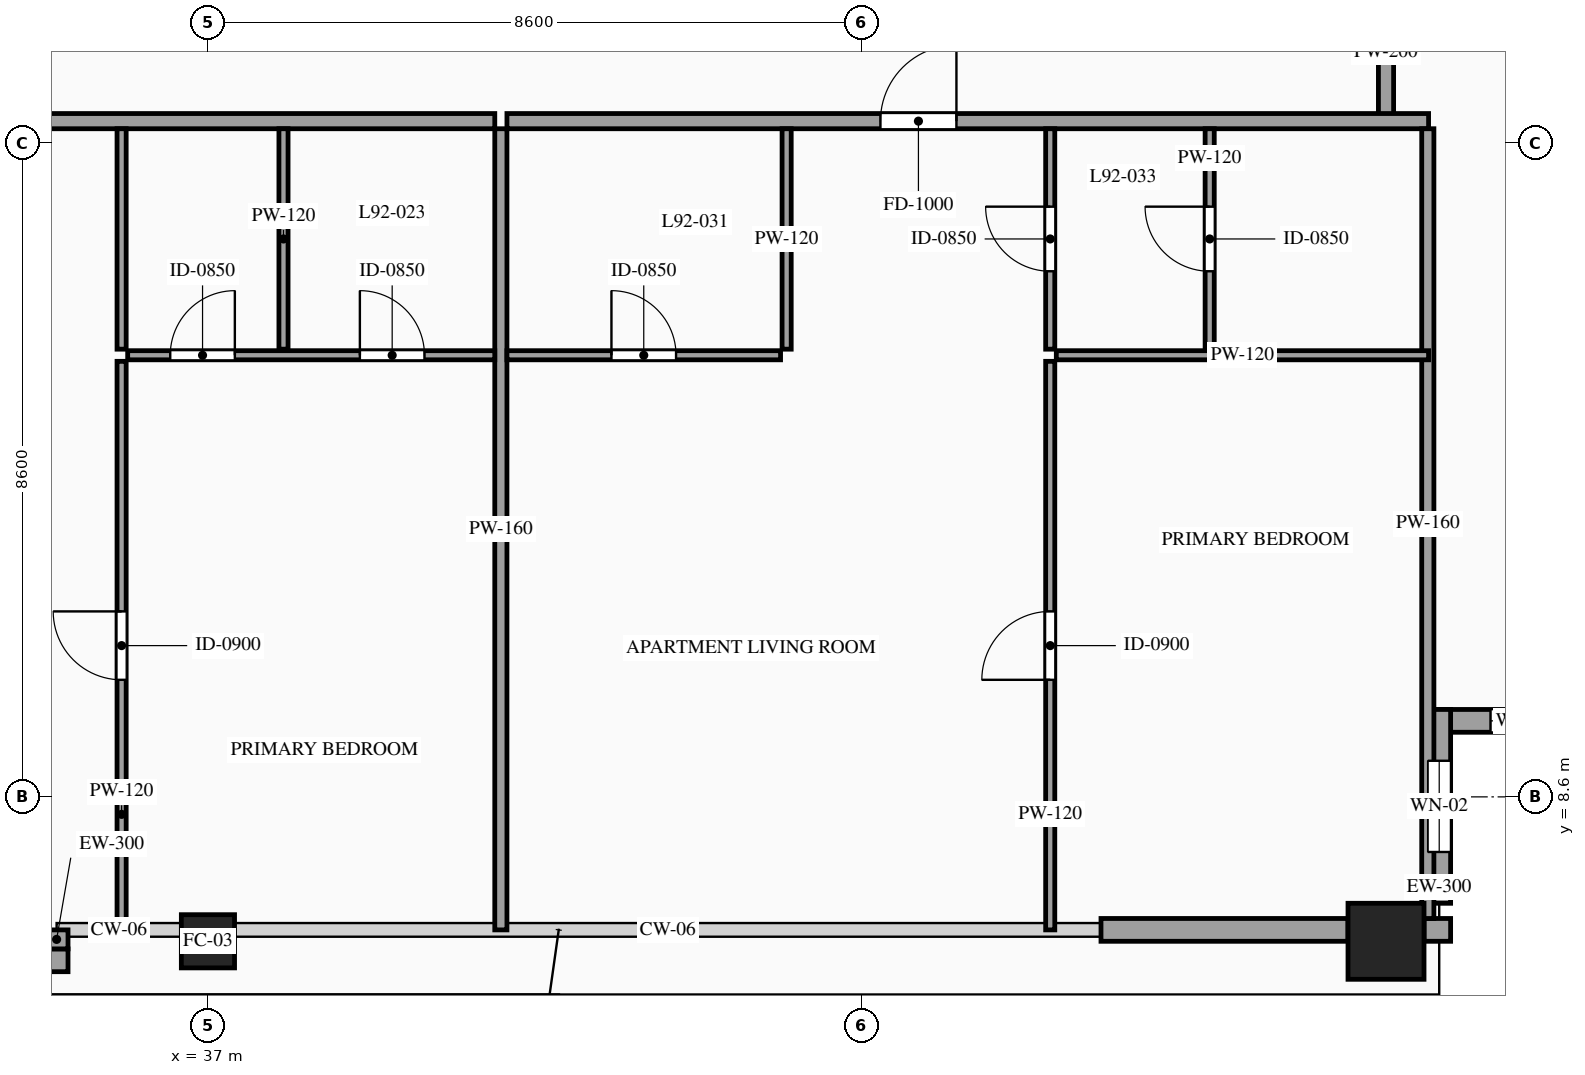
"""IFC4 building model, lengths in metres.
Left out: names, types, materials, properties, quantities, classifications, styles, units other than length and angle.
Written with IfcOpenShell. Run it as: python <this file> out.ifc"""

import sys

from ifc_helpers import new_model, si_unit, direction, frame, frame_2d, origin, origin_2d, place, context, subcontext, project, spatial, rectangle, hollow_rectangle, extrude, source, transform, mapped, element, fill, save


model = new_model("IFC4")
c1 = context("Model", 3, precision=1e-05, world=origin(), true_north=direction((0.0, 1.0)))
c2 = subcontext(c1, "Body", "Model", "MODEL_VIEW")
j1 = project(units=[si_unit("LENGTHUNIT", "METRE"), si_unit("PLANEANGLEUNIT", "RADIAN")], contexts=[c1])
p1 = place(None, origin())
s1 = spatial("IfcSite", under=j1, at=p1, CompositionType="ELEMENT")
p2 = place(p1, origin())
s2 = spatial("IfcBuilding", under=s1, at=p2, CompositionType="ELEMENT")
p3 = place(p2, frame((0.0, 0.0, 343.2)))
s3 = spatial("IfcBuildingStorey", under=s2, at=p3, CompositionType="ELEMENT", Elevation=343.2)
m1 = source(origin(), c2, "Body", "SweptSolid", [
    extrude(hollow_rectangle(XDim=0.7, YDim=0.7, WallThickness=0.032, at=origin_2d()), origin(), (0.0, 0.0, 1.0), 4.0),
])
p4 = place(p3, frame((37.0, 6.7, 0.0), z_axis=(0.0, 0.0, 1.0), x_axis=(1.0, 0.0, 0.0)))
e1 = element("IfcColumn", 1, at=p4, inside=s3, PredefinedType="COLUMN", context=c2, shape_type="MappedRepresentation", body=[
    mapped(m1, transform((0.0, 0.0, 0.0), scale=1.0)),
])
m2 = source(origin(), c2, "Body", "SweptSolid", [
    extrude(hollow_rectangle(XDim=1.0, YDim=1.0, WallThickness=0.048, at=origin_2d()), origin(), (0.0, 0.0, 1.0), 4.0),
])
p5 = place(p3, frame((52.5, 6.7, 0.0), z_axis=(0.0, 0.0, 1.0), x_axis=(1.0, 0.0, 0.0)))
e2 = element("IfcColumn", 2, at=p5, inside=s3, PredefinedType="COLUMN", context=c2, shape_type="MappedRepresentation", body=[
    mapped(m2, transform((0.0, 0.0, 0.0), scale=1.0)),
])
p6 = place(p3, frame((53.05, 9.6, 0.0), z_axis=(0.0, 0.0, 1.0), x_axis=(1.0, 0.0, 0.0)))
e3 = element("IfcWall", 3, at=p6, inside=s3, PredefinedType="SOLIDWALL", context=c2, shape_type="SweptSolid", body=[
    extrude(rectangle(XDim=2.55, YDim=0.3, at=frame_2d((1.275, 0.0))), origin(), (0.0, 0.0, 1.0), 3.76),
])
p7 = place(p6, frame((0.825, 0.0, 0.85)))
e4 = element("IfcOpeningElement", 4, at=p7, cuts=e3, PredefinedType="OPENING", context=c2, shape_type="SweptSolid", body=[
    extrude(rectangle(XDim=0.9, YDim=1.5, at=frame_2d((0.45, 0.75))), frame((0.0, 0.165, 0.0), z_axis=(0.0, -1.0, 0.0), x_axis=(1.0, 0.0, 0.0)), (0.0, 0.0, 1.0), 0.33),
])
p8 = place(p3, frame((53.2, 7.2, 0.0), z_axis=(0.0, 0.0, 1.0), x_axis=(0.0, 1.0, 0.0)))
e5 = element("IfcWall", 5, at=p8, inside=s3, PredefinedType="SOLIDWALL", context=c2, shape_type="SweptSolid", body=[
    extrude(rectangle(XDim=2.55, YDim=0.3, at=frame_2d((1.275, 0.0))), origin(), (0.0, 0.0, 1.0), 3.76),
])
p9 = place(p8, frame((0.675, 0.0, 0.85)))
e6 = element("IfcOpeningElement", 6, at=p9, cuts=e5, PredefinedType="OPENING", context=c2, shape_type="SweptSolid", body=[
    extrude(rectangle(XDim=1.2, YDim=2.1, at=frame_2d((0.6, 1.05))), frame((0.0, 0.165, 0.0), z_axis=(0.0, -1.0, 0.0), x_axis=(1.0, 0.0, 0.0)), (0.0, 0.0, 1.0), 0.33),
])
m3 = source(origin(), c2, "Body", "SweptSolid", [
    extrude(rectangle(XDim=0.35, YDim=0.3, at=frame_2d((0.175, 0.0))), origin(), (0.0, 0.0, 1.0), 3.76),
])
p10 = place(p3, frame((53.0, 6.85, 0.0), z_axis=(0.0, 0.0, 1.0), x_axis=(1.0, 0.0, 0.0)))
e7 = element("IfcWall", 7, at=p10, inside=s3, PredefinedType="SOLIDWALL", context=c2, shape_type="MappedRepresentation", body=[
    mapped(m3, transform((0.0, 0.0, 0.0), scale=1.0)),
])
m4 = source(origin(), c2, "Body", "SweptSolid", [
    extrude(rectangle(XDim=3.25, YDim=0.3, at=frame_2d((1.625, 0.0))), origin(), (0.0, 0.0, 1.0), 3.365),
])
p11 = place(p3, frame((48.75, 6.85, 0.0), z_axis=(0.0, 0.0, 1.0), x_axis=(1.0, 0.0, 0.0)))
e8 = element("IfcWall", 8, at=p11, inside=s3, PredefinedType="SOLIDWALL", context=c2, shape_type="MappedRepresentation", body=[
    mapped(m4, transform((0.0, 0.0, 0.0), scale=1.0)),
])
p12 = place(p3, frame((33.159, 6.45, 0.0), z_axis=(0.0, 0.0, 1.0), x_axis=(1.0, 0.0, 0.0)))
e9 = element("IfcWall", 9, at=p12, inside=s3, PredefinedType="SOLIDWALL", context=c2, shape_type="SweptSolid", body=[
    extrude(rectangle(XDim=2.0, YDim=0.3, at=frame_2d((1.0, 0.0))), origin(), (0.0, 0.0, 1.0), 3.365),
])
p13 = place(p12, frame((0.3, 0.0, 0.0)))
e10 = element("IfcOpeningElement", 10, at=p13, cuts=e9, PredefinedType="OPENING", context=c2, shape_type="SweptSolid", body=[
    extrude(rectangle(XDim=1.4, YDim=2.3, at=frame_2d((0.7, 1.15))), frame((0.0, 0.165, 0.0), z_axis=(0.0, -1.0, 0.0), x_axis=(1.0, 0.0, 0.0)), (0.0, 0.0, 1.0), 0.33),
])
m5 = source(origin(), c2, "Body", "SweptSolid", [
    extrude(rectangle(XDim=0.25, YDim=0.3, at=frame_2d((0.125, 0.0))), origin(), (0.0, 0.0, 1.0), 3.76),
])
p14 = place(p3, frame((35.009, 6.6, 0.0), z_axis=(0.0, 0.0, 1.0), x_axis=(0.0, 1.0, 0.0)))
e11 = element("IfcWall", 11, at=p14, inside=s3, PredefinedType="SOLIDWALL", context=c2, shape_type="MappedRepresentation", body=[
    mapped(m5, transform((0.0, 0.0, 0.0), scale=1.0)),
])
m6 = source(origin(), c2, "Body", "SweptSolid", [
    extrude(rectangle(XDim=1.7, YDim=0.2, at=frame_2d((0.85, 0.0))), origin(), (0.0, 0.0, 1.0), 3.76),
])
p15 = place(p3, frame((52.5, 17.55, 0.0), z_axis=(0.0, 0.0, 1.0), x_axis=(0.0, 1.0, 0.0)))
e12 = element("IfcWall", 12, at=p15, inside=s3, PredefinedType="PARTITIONING", context=c2, shape_type="MappedRepresentation", body=[
    mapped(m6, transform((0.0, 0.0, 0.0), scale=1.0)),
])
p16 = place(p3, frame((20.94, 17.49, 0.0), z_axis=(0.0, 0.0, 1.0), x_axis=(1.0, 0.0, 0.0)))
e13 = element("IfcWall", 13, at=p16, inside=s3, PredefinedType="PARTITIONING", context=c2, shape_type="SweptSolid", body=[
    extrude(rectangle(XDim=19.834, YDim=0.2, at=frame_2d((9.917, 0.0))), origin(), (0.0, 0.0, 1.0), 3.76),
])
p17 = place(p16, frame((11.824, 0.0, 0.0)))
e14 = element("IfcOpeningElement", 14, at=p17, cuts=e13, PredefinedType="OPENING", context=c2, shape_type="SweptSolid", body=[
    extrude(rectangle(XDim=1.0, YDim=2.2, at=frame_2d((0.5, 1.1))), frame((0.0, 0.115, 0.0), z_axis=(0.0, -1.0, 0.0), x_axis=(1.0, 0.0, 0.0)), (0.0, 0.0, 1.0), 0.23),
])
m7 = source(origin(), c2, "Body", "SweptSolid", [
    extrude(rectangle(XDim=10.54, YDim=0.16, at=frame_2d((5.27, 0.0))), origin(), (0.0, 0.0, 1.0), 3.76),
])
p18 = place(p3, frame((40.854, 6.85, 0.0), z_axis=(0.0, 0.0, 1.0), x_axis=(0.0, 1.0, 0.0)))
e15 = element("IfcWall", 15, at=p18, inside=s3, PredefinedType="PARTITIONING", context=c2, shape_type="MappedRepresentation", body=[
    mapped(m7, transform((0.0, 0.0, 0.0), scale=1.0)),
])
m8 = source(origin(), c2, "Body", "SweptSolid", [
    extrude(rectangle(XDim=2.9, YDim=0.12, at=frame_2d((1.45, 0.0))), origin(), (0.0, 0.0, 1.0), 3.76),
])
for number, where, z_axis, x_axis in (
    (16, (37.994, 14.49, 0.0), (0.0, 0.0, 1.0), (0.0, 1.0, 0.0)),
    (17, (35.864, 14.49, 0.0), (0.0, 0.0, 1.0), (0.0, 1.0, 0.0)),
):
    element("IfcWall", number, at=place(p3, frame(where, z_axis=z_axis, x_axis=x_axis)), inside=s3, PredefinedType="PARTITIONING", context=c2, shape_type="MappedRepresentation", body=[
        mapped(m8, transform((0.0, 0.0, 0.0), scale=1.0)),
    ])
p19 = place(p3, frame((35.944, 14.41, 0.0), z_axis=(0.0, 0.0, 1.0), x_axis=(1.0, 0.0, 0.0)))
e18 = element("IfcWall", 18, at=p19, inside=s3, PredefinedType="PARTITIONING", context=c2, shape_type="SweptSolid", body=[
    extrude(rectangle(XDim=4.83, YDim=0.12, at=frame_2d((2.415, 0.0))), origin(), (0.0, 0.0, 1.0), 3.76),
])
p20 = place(p19, frame((3.055, 0.0, 0.0)))
e19 = element("IfcOpeningElement", 19, at=p20, cuts=e18, PredefinedType="OPENING", context=c2, shape_type="SweptSolid", body=[
    extrude(rectangle(XDim=0.85, YDim=2.1, at=frame_2d((0.425, 1.05))), frame((0.0, 0.075, 0.0), z_axis=(0.0, -1.0, 0.0), x_axis=(1.0, 0.0, 0.0)), (0.0, 0.0, 1.0), 0.15),
])
p21 = place(p19, frame((0.56, 0.0, 0.0)))
e20 = element("IfcOpeningElement", 20, at=p21, cuts=e18, PredefinedType="OPENING", context=c2, shape_type="SweptSolid", body=[
    extrude(rectangle(XDim=0.85, YDim=2.1, at=frame_2d((0.425, 1.05))), frame((0.0, 0.075, 0.0), z_axis=(0.0, -1.0, 0.0), x_axis=(1.0, 0.0, 0.0)), (0.0, 0.0, 1.0), 0.15),
])
p22 = place(p3, frame((35.864, 6.85, 0.0), z_axis=(0.0, 0.0, 1.0), x_axis=(0.0, 1.0, 0.0)))
e21 = element("IfcWall", 21, at=p22, inside=s3, PredefinedType="PARTITIONING", context=c2, shape_type="SweptSolid", body=[
    extrude(rectangle(XDim=7.48, YDim=0.12, at=frame_2d((3.74, 0.0))), origin(), (0.0, 0.0, 1.0), 3.76),
])
p23 = place(p22, frame((3.29, 0.0, 0.0)))
e22 = element("IfcOpeningElement", 22, at=p23, cuts=e21, PredefinedType="OPENING", context=c2, shape_type="SweptSolid", body=[
    extrude(rectangle(XDim=0.9, YDim=2.15, at=frame_2d((0.45, 1.075))), frame((0.0, 0.075, 0.0), z_axis=(0.0, -1.0, 0.0), x_axis=(1.0, 0.0, 0.0)), (0.0, 0.0, 1.0), 0.15),
])
p24 = place(p3, frame((40.934, 17.49, 0.0), z_axis=(0.0, 0.0, 1.0), x_axis=(1.0, 0.0, 0.0)))
e23 = element("IfcWall", 23, at=p24, inside=s3, PredefinedType="PARTITIONING", context=c2, shape_type="SweptSolid", body=[
    extrude(rectangle(XDim=12.126, YDim=0.2, at=frame_2d((6.063, 0.0))), origin(), (0.0, 0.0, 1.0), 3.76),
])
p25 = place(p24, frame((4.914, 0.0, 0.0)))
e24 = element("IfcOpeningElement", 24, at=p25, cuts=e23, PredefinedType="OPENING", context=c2, shape_type="SweptSolid", body=[
    extrude(rectangle(XDim=1.0, YDim=2.2, at=frame_2d((0.5, 1.1))), frame((0.0, 0.115, 0.0), z_axis=(0.0, -1.0, 0.0), x_axis=(1.0, 0.0, 0.0)), (0.0, 0.0, 1.0), 0.23),
])
m9 = source(origin(), c2, "Body", "SweptSolid", [
    extrude(rectangle(XDim=10.39, YDim=0.16, at=frame_2d((5.195, 0.0))), origin(), (0.0, 0.0, 1.0), 3.76),
])
p26 = place(p3, frame((53.05, 7.0, 0.0), z_axis=(0.0, 0.0, 1.0), x_axis=(0.0, 1.0, 0.0)))
e25 = element("IfcWall", 25, at=p26, inside=s3, PredefinedType="PARTITIONING", context=c2, shape_type="MappedRepresentation", body=[
    mapped(m9, transform((0.0, 0.0, 0.0), scale=1.0)),
])
p27 = place(p3, frame((40.934, 14.41, 0.0), z_axis=(0.0, 0.0, 1.0), x_axis=(1.0, 0.0, 0.0)))
e26 = element("IfcWall", 26, at=p27, inside=s3, PredefinedType="PARTITIONING", context=c2, shape_type="SweptSolid", body=[
    extrude(rectangle(XDim=3.6, YDim=0.12, at=frame_2d((1.8, 0.0))), origin(), (0.0, 0.0, 1.0), 3.76),
])
p28 = place(p27, frame((1.375, 0.0, 0.0)))
e27 = element("IfcOpeningElement", 27, at=p28, cuts=e26, PredefinedType="OPENING", context=c2, shape_type="SweptSolid", body=[
    extrude(rectangle(XDim=0.85, YDim=2.1, at=frame_2d((0.425, 1.05))), frame((0.0, 0.075, 0.0), z_axis=(0.0, -1.0, 0.0), x_axis=(1.0, 0.0, 0.0)), (0.0, 0.0, 1.0), 0.15),
])
p29 = place(p3, frame((44.614, 14.49, 0.0), z_axis=(0.0, 0.0, 1.0), x_axis=(0.0, 1.0, 0.0)))
e28 = element("IfcWall", 28, at=p29, inside=s3, PredefinedType="PARTITIONING", context=c2, shape_type="MappedRepresentation", body=[
    mapped(m8, transform((0.0, 0.0, 0.0), scale=1.0)),
])
p30 = place(p3, frame((50.18, 14.49, 0.0), z_axis=(0.0, 0.0, 1.0), x_axis=(0.0, 1.0, 0.0)))
e29 = element("IfcWall", 29, at=p30, inside=s3, PredefinedType="PARTITIONING", context=c2, shape_type="SweptSolid", body=[
    extrude(rectangle(XDim=2.9, YDim=0.12, at=frame_2d((1.45, 0.0))), origin(), (0.0, 0.0, 1.0), 3.305),
])
p31 = place(p30, frame((1.025, 0.0, 0.0)))
e30 = element("IfcOpeningElement", 30, at=p31, cuts=e29, PredefinedType="OPENING", context=c2, shape_type="SweptSolid", body=[
    extrude(rectangle(XDim=0.85, YDim=2.1, at=frame_2d((0.425, 1.05))), frame((0.0, 0.075, 0.0), z_axis=(0.0, -1.0, 0.0), x_axis=(1.0, 0.0, 0.0)), (0.0, 0.0, 1.0), 0.15),
])
m10 = source(origin(), c2, "Body", "SweptSolid", [
    extrude(rectangle(XDim=4.898, YDim=0.12, at=frame_2d((2.449, 0.0))), origin(), (0.0, 0.0, 1.0), 3.76),
])
p32 = place(p3, frame((48.162, 14.41, 0.0), z_axis=(0.0, 0.0, 1.0), x_axis=(1.0, 0.0, 0.0)))
e31 = element("IfcWall", 31, at=p32, inside=s3, PredefinedType="PARTITIONING", context=c2, shape_type="MappedRepresentation", body=[
    mapped(m10, transform((0.0, 0.0, 0.0), scale=1.0)),
])
p33 = place(p3, frame((48.082, 6.85, 0.0), z_axis=(0.0, 0.0, 1.0), x_axis=(0.0, 1.0, 0.0)))
e32 = element("IfcWall", 32, at=p33, inside=s3, PredefinedType="PARTITIONING", context=c2, shape_type="SweptSolid", body=[
    extrude(rectangle(XDim=7.48, YDim=0.12, at=frame_2d((3.74, 0.0))), origin(), (0.0, 0.0, 1.0), 3.76),
])
p34 = place(p33, frame((3.29, 0.0, 0.0)))
e33 = element("IfcOpeningElement", 33, at=p34, cuts=e32, PredefinedType="OPENING", context=c2, shape_type="SweptSolid", body=[
    extrude(rectangle(XDim=0.9, YDim=2.15, at=frame_2d((0.45, 1.075))), frame((0.0, 0.075, 0.0), z_axis=(0.0, -1.0, 0.0), x_axis=(1.0, 0.0, 0.0)), (0.0, 0.0, 1.0), 0.15),
])
p35 = place(p3, frame((48.082, 14.49, 0.0), z_axis=(0.0, 0.0, 1.0), x_axis=(0.0, 1.0, 0.0)))
e34 = element("IfcWall", 34, at=p35, inside=s3, PredefinedType="PARTITIONING", context=c2, shape_type="SweptSolid", body=[
    extrude(rectangle(XDim=2.9, YDim=0.12, at=frame_2d((1.45, 0.0))), origin(), (0.0, 0.0, 1.0), 3.76),
])
p36 = place(p35, frame((1.025, 0.0, 0.0)))
e35 = element("IfcOpeningElement", 35, at=p36, cuts=e34, PredefinedType="OPENING", context=c2, shape_type="SweptSolid", body=[
    extrude(rectangle(XDim=0.85, YDim=2.1, at=frame_2d((0.425, 1.05))), frame((0.0, 0.075, 0.0), z_axis=(0.0, -1.0, 0.0), x_axis=(1.0, 0.0, 0.0)), (0.0, 0.0, 1.0), 0.15),
])
m11 = source(origin(), c2, "Body", "SweptSolid", [
    extrude(rectangle(XDim=0.9, YDim=1.5, at=frame_2d((0.45, 0.75))), frame((0.0, 0.03, 0.0), z_axis=(0.0, -1.0, 0.0), x_axis=(1.0, 0.0, 0.0)), (0.0, 0.0, 1.0), 0.06),
])
p37 = place(p7, origin())
e36 = element("IfcWindow", 36, at=p37, inside=s3, PartitioningType="SINGLE_PANEL", PredefinedType="WINDOW", context=c2, shape_type="MappedRepresentation", body=[
    mapped(m11, transform((0.0, 0.0, 0.0), scale=1.0)),
])
fill(e4, e36)
m12 = source(origin(), c2, "Body", "SweptSolid", [
    extrude(rectangle(XDim=1.2, YDim=2.1, at=frame_2d((0.6, 1.05))), frame((0.0, 0.03, 0.0), z_axis=(0.0, -1.0, 0.0), x_axis=(1.0, 0.0, 0.0)), (0.0, 0.0, 1.0), 0.06),
])
p38 = place(p9, origin())
e37 = element("IfcWindow", 37, at=p38, inside=s3, PartitioningType="SINGLE_PANEL", PredefinedType="WINDOW", context=c2, shape_type="MappedRepresentation", body=[
    mapped(m12, transform((0.0, 0.0, 0.0), scale=1.0)),
])
fill(e6, e37)
m13 = source(origin(), c2, "Body", "SweptSolid", [
    extrude(rectangle(XDim=0.85, YDim=2.1, at=frame_2d((0.425, 1.05))), frame((0.0, 0.025, 0.0), z_axis=(0.0, -1.0, 0.0), x_axis=(1.0, 0.0, 0.0)), (0.0, 0.0, 1.0), 0.05),
])
p39 = place(p20, origin())
e38 = element("IfcDoor", 38, at=p39, inside=s3, OperationType="SINGLE_SWING_LEFT", PredefinedType="DOOR", context=c2, shape_type="MappedRepresentation", body=[
    mapped(m13, transform((0.0, 0.0, 0.0), scale=1.0)),
])
fill(e19, e38)
p40 = place(p21, origin())
e39 = element("IfcDoor", 39, at=p40, inside=s3, OperationType="SINGLE_SWING_RIGHT", PredefinedType="DOOR", context=c2, shape_type="MappedRepresentation", body=[
    mapped(m13, transform((0.0, 0.0, 0.0), scale=1.0)),
])
fill(e20, e39)
m14 = source(origin(), c2, "Body", "SweptSolid", [
    extrude(rectangle(XDim=0.9, YDim=2.15, at=frame_2d((0.45, 1.075))), frame((0.0, 0.025, 0.0), z_axis=(0.0, -1.0, 0.0), x_axis=(1.0, 0.0, 0.0)), (0.0, 0.0, 1.0), 0.05),
])
p41 = place(p23, origin())
e40 = element("IfcDoor", 40, at=p41, inside=s3, OperationType="SINGLE_SWING_RIGHT", PredefinedType="DOOR", context=c2, shape_type="MappedRepresentation", body=[
    mapped(m14, transform((0.0, 0.0, 0.0), scale=1.0)),
])
fill(e22, e40)
m15 = source(origin(), c2, "Body", "SweptSolid", [
    extrude(rectangle(XDim=1.0, YDim=2.2, at=frame_2d((0.5, 1.1))), frame((0.0, 0.025, 0.0), z_axis=(0.0, -1.0, 0.0), x_axis=(1.0, 0.0, 0.0)), (0.0, 0.0, 1.0), 0.05),
])
p42 = place(p25, origin())
e41 = element("IfcDoor", 41, at=p42, inside=s3, OperationType="SINGLE_SWING_RIGHT", PredefinedType="DOOR", context=c2, shape_type="MappedRepresentation", body=[
    mapped(m15, transform((0.0, 0.0, 0.0), scale=1.0)),
])
fill(e24, e41)
p43 = place(p28, origin())
e42 = element("IfcDoor", 42, at=p43, inside=s3, OperationType="SINGLE_SWING_LEFT", PredefinedType="DOOR", context=c2, shape_type="MappedRepresentation", body=[
    mapped(m13, transform((0.0, 0.0, 0.0), scale=1.0)),
])
fill(e27, e42)
p44 = place(p31, origin())
e43 = element("IfcDoor", 43, at=p44, inside=s3, OperationType="SINGLE_SWING_RIGHT", PredefinedType="DOOR", context=c2, shape_type="MappedRepresentation", body=[
    mapped(m13, transform((0.0, 0.0, 0.0), scale=1.0)),
])
fill(e30, e43)
p45 = place(p34, origin())
e44 = element("IfcDoor", 44, at=p45, inside=s3, OperationType="SINGLE_SWING_LEFT", PredefinedType="DOOR", context=c2, shape_type="MappedRepresentation", body=[
    mapped(m14, transform((0.0, 0.0, 0.0), scale=1.0)),
])
fill(e33, e44)
p46 = place(p36, origin())
e45 = element("IfcDoor", 45, at=p46, inside=s3, OperationType="SINGLE_SWING_RIGHT", PredefinedType="DOOR", context=c2, shape_type="MappedRepresentation", body=[
    mapped(m13, transform((0.0, 0.0, 0.0), scale=1.0)),
])
fill(e35, e45)
save(model, sys.argv[1])
